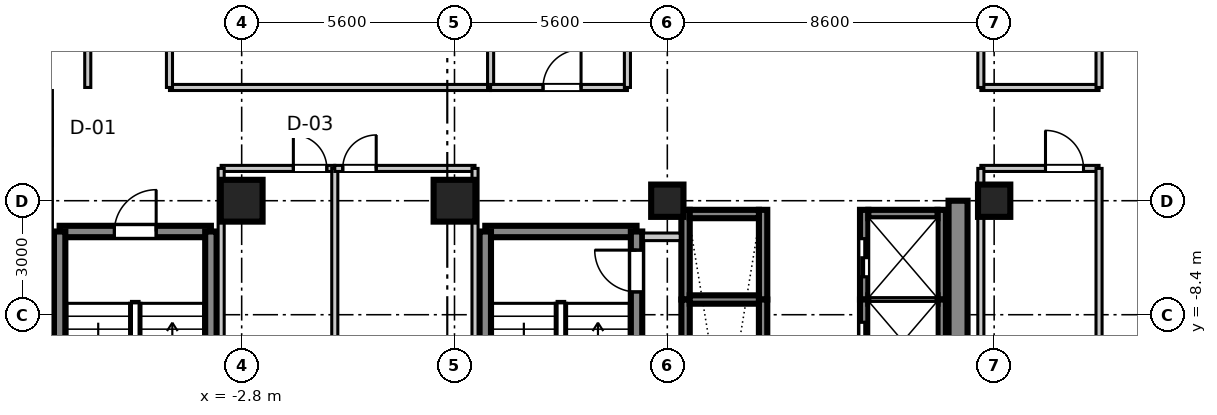
"""IFC4 building model, lengths in metres.
Left out: names, types, materials, properties, quantities, classifications, styles, units other than length and angle.
Written with IfcOpenShell. Run it as: python <this file> out.ifc"""

import sys

from ifc_helpers import new_model, si_unit, direction, frame, frame_2d, origin, origin_2d, place, context, subcontext, project, spatial, rectangle, extrude, source, transform, mapped, element, fill, save


model = new_model("IFC4")
c1 = context("Model", 3, precision=1e-05, world=origin(), true_north=direction((0.0, 1.0)))
c2 = subcontext(c1, "Body", "Model", "MODEL_VIEW")
j1 = project(units=[si_unit("LENGTHUNIT", "METRE"), si_unit("PLANEANGLEUNIT", "RADIAN")], contexts=[c1])
p1 = place(None, origin())
s1 = spatial("IfcSite", under=j1, at=p1, CompositionType="ELEMENT")
p2 = place(p1, origin())
s2 = spatial("IfcBuilding", under=s1, at=p2, CompositionType="ELEMENT")
p3 = place(p2, frame((0.0, 0.0, 192.8)))
s3 = spatial("IfcBuildingStorey", under=s2, at=p3, CompositionType="ELEMENT", Elevation=192.8)
m1 = source(origin(), c2, "Body", "SweptSolid", [
    extrude(rectangle(XDim=1.1, YDim=1.1, at=origin_2d()), origin(), (0.0, 0.0, 1.0), 3.605),
])
for number, where, z_axis, x_axis in (
    (1, (-2.8, -5.4, 0.0), (0.0, 0.0, 1.0), (1.0, 0.0, 0.0)),
    (2, (2.8, -5.4, 0.0), (0.0, 0.0, 1.0), (1.0, 0.0, 0.0)),
):
    element("IfcColumn", number, at=place(p3, frame(where, z_axis=z_axis, x_axis=x_axis)), inside=s3, PredefinedType="COLUMN", context=c2, shape_type="MappedRepresentation", body=[
        mapped(m1, transform((0.0, 0.0, 0.0), scale=1.0)),
    ])
m2 = source(origin(), c2, "Body", "SweptSolid", [
    extrude(rectangle(XDim=0.85, YDim=0.85, at=origin_2d()), origin(), (0.0, 0.0, 1.0), 3.605),
])
for number, where, z_axis, x_axis in (
    (3, (8.4, -5.4, 0.0), (0.0, 0.0, 1.0), (1.0, 0.0, 0.0)),
    (4, (17.0, -5.4, 0.0), (0.0, 0.0, 1.0), (1.0, 0.0, 0.0)),
):
    element("IfcColumn", number, at=place(p3, frame(where, z_axis=z_axis, x_axis=x_axis)), inside=s3, PredefinedType="PILASTER", context=c2, shape_type="MappedRepresentation", body=[
        mapped(m2, transform((0.0, 0.0, 0.0), scale=1.0)),
    ])
m3 = source(origin(), c2, "Body", "SweptSolid", [
    extrude(rectangle(XDim=11.6, YDim=0.5, at=frame_2d((5.8, 0.0))), origin(), (0.0, 0.0, 1.0), 3.39),
])
p4 = place(p3, frame((16.05, -17.0, 0.0), z_axis=(0.0, 0.0, 1.0), x_axis=(0.0, 1.0, 0.0)))
e5 = element("IfcWall", 5, at=p4, inside=s3, PredefinedType="SHEAR", context=c2, shape_type="MappedRepresentation", body=[
    mapped(m3, transform((0.0, 0.0, 0.0), scale=1.0)),
])
m4 = source(origin(), c2, "Body", "SweptSolid", [
    extrude(rectangle(XDim=3.98, YDim=0.3, at=frame_2d((1.99, 0.0))), origin(), (0.0, 0.0, 1.0), 3.39),
])
p5 = place(p3, frame((3.61, -6.21, 0.0), z_axis=(0.0, 0.0, 1.0), x_axis=(1.0, 0.0, 0.0)))
e6 = element("IfcWall", 6, at=p5, inside=s3, PredefinedType="SHEAR", context=c2, shape_type="MappedRepresentation", body=[
    mapped(m4, transform((0.0, 0.0, 0.0), scale=1.0)),
])
m5 = source(origin(), c2, "Body", "SweptSolid", [
    extrude(rectangle(XDim=9.38, YDim=0.3, at=frame_2d((4.69, 0.0))), origin(), (0.0, 0.0, 1.0), 3.39),
])
p6 = place(p3, frame((3.61, -15.59, 0.0), z_axis=(0.0, 0.0, 1.0), x_axis=(0.0, 1.0, 0.0)))
e7 = element("IfcWall", 7, at=p6, inside=s3, PredefinedType="SHEAR", context=c2, shape_type="MappedRepresentation", body=[
    mapped(m5, transform((0.0, 0.0, 0.0), scale=1.0)),
])
p7 = place(p3, frame((7.59, -15.59, 0.0), z_axis=(0.0, 0.0, 1.0), x_axis=(0.0, 1.0, 0.0)))
e8 = element("IfcWall", 8, at=p7, inside=s3, PredefinedType="SHEAR", context=c2, shape_type="MappedRepresentation", body=[
    mapped(m5, transform((0.0, 0.0, 0.0), scale=1.0)),
])
p8 = place(p7, frame((7.79, 0.0, 0.0)))
e9 = element("IfcOpeningElement", 9, at=p8, cuts=e8, PredefinedType="OPENING", context=c2, shape_type="SweptSolid", body=[
    extrude(rectangle(XDim=1.1, YDim=2.15, at=frame_2d((0.55, 1.075))), frame((0.0, 0.16, 0.0), z_axis=(0.0, -1.0, 0.0), x_axis=(1.0, 0.0, 0.0)), (0.0, 0.0, 1.0), 0.32),
])
p9 = place(p3, frame((-7.59, -6.21, 0.0), z_axis=(0.0, 0.0, 1.0), x_axis=(1.0, 0.0, 0.0)))
e10 = element("IfcWall", 10, at=p9, inside=s3, PredefinedType="SHEAR", context=c2, shape_type="MappedRepresentation", body=[
    mapped(m4, transform((0.0, 0.0, 0.0), scale=1.0)),
])
p10 = place(p9, frame((1.44, 0.0, 0.0)))
e11 = element("IfcOpeningElement", 11, at=p10, cuts=e10, PredefinedType="OPENING", context=c2, shape_type="SweptSolid", body=[
    extrude(rectangle(XDim=1.1, YDim=2.15, at=frame_2d((0.55, 1.075))), frame((0.0, 0.16, 0.0), z_axis=(0.0, -1.0, 0.0), x_axis=(1.0, 0.0, 0.0)), (0.0, 0.0, 1.0), 0.32),
])
for number, where, z_axis, x_axis in (
    (12, (-7.59, -15.59, 0.0), (0.0, 0.0, 1.0), (0.0, 1.0, 0.0)),
    (13, (-3.61, -15.59, 0.0), (0.0, 0.0, 1.0), (0.0, 1.0, 0.0)),
):
    element("IfcWall", number, at=place(p3, frame(where, z_axis=z_axis, x_axis=x_axis)), inside=s3, PredefinedType="SHEAR", context=c2, shape_type="MappedRepresentation", body=[
        mapped(m5, transform((0.0, 0.0, 0.0), scale=1.0)),
    ])
m6 = source(origin(), c2, "Body", "SweptSolid", [
    extrude(rectangle(XDim=2.36, YDim=0.22, at=frame_2d((1.18, 0.0))), origin(), (0.0, 0.0, 1.0), 3.39),
])
p11 = place(p3, frame((13.58, -8.0, 0.0), z_axis=(0.0, 0.0, 1.0), x_axis=(0.0, 1.0, 0.0)))
e14 = element("IfcWall", 14, at=p11, inside=s3, PredefinedType="SHEAR", context=c2, shape_type="MappedRepresentation", body=[
    mapped(m6, transform((0.0, 0.0, 0.0), scale=1.0)),
])
p12 = place(p11, frame((0.6, 0.0, 0.0)))
e15 = element("IfcOpeningElement", 15, at=p12, cuts=e14, PredefinedType="OPENING", context=c2, shape_type="SweptSolid", body=[
    extrude(rectangle(XDim=1.0, YDim=2.2, at=frame_2d((0.5, 1.1))), frame((0.0, 0.12, 0.0), z_axis=(0.0, -1.0, 0.0), x_axis=(1.0, 0.0, 0.0)), (0.0, 0.0, 1.0), 0.24),
])
p13 = place(p3, frame((15.62, -8.0, 0.0), z_axis=(0.0, 0.0, 1.0), x_axis=(0.0, 1.0, 0.0)))
e16 = element("IfcWall", 16, at=p13, inside=s3, PredefinedType="SHEAR", context=c2, shape_type="MappedRepresentation", body=[
    mapped(m6, transform((0.0, 0.0, 0.0), scale=1.0)),
])
m7 = source(origin(), c2, "Body", "SweptSolid", [
    extrude(rectangle(XDim=1.82, YDim=0.22, at=frame_2d((0.91, 0.0))), origin(), (0.0, 0.0, 1.0), 3.39),
])
p14 = place(p3, frame((13.69, -5.75, 0.0), z_axis=(0.0, 0.0, 1.0), x_axis=(1.0, 0.0, 0.0)))
e17 = element("IfcWall", 17, at=p14, inside=s3, PredefinedType="SHEAR", context=c2, shape_type="MappedRepresentation", body=[
    mapped(m7, transform((0.0, 0.0, 0.0), scale=1.0)),
])
m8 = source(origin(), c2, "Body", "SweptSolid", [
    extrude(rectangle(XDim=2.2, YDim=0.22, at=frame_2d((1.1, 0.0))), origin(), (0.0, 0.0, 1.0), 3.39),
])
p15 = place(p3, frame((13.58, -10.2, 0.0), z_axis=(0.0, 0.0, 1.0), x_axis=(0.0, 1.0, 0.0)))
e18 = element("IfcWall", 18, at=p15, inside=s3, PredefinedType="SHEAR", context=c2, shape_type="MappedRepresentation", body=[
    mapped(m8, transform((0.0, 0.0, 0.0), scale=1.0)),
])
p16 = place(p15, frame((0.6, 0.0, 0.0)))
e19 = element("IfcOpeningElement", 19, at=p16, cuts=e18, PredefinedType="OPENING", context=c2, shape_type="SweptSolid", body=[
    extrude(rectangle(XDim=1.0, YDim=2.2, at=frame_2d((0.5, 1.1))), frame((0.0, 0.12, 0.0), z_axis=(0.0, -1.0, 0.0), x_axis=(1.0, 0.0, 0.0)), (0.0, 0.0, 1.0), 0.24),
])
p17 = place(p3, frame((15.62, -10.2, 0.0), z_axis=(0.0, 0.0, 1.0), x_axis=(0.0, 1.0, 0.0)))
e20 = element("IfcWall", 20, at=p17, inside=s3, PredefinedType="SHEAR", context=c2, shape_type="MappedRepresentation", body=[
    mapped(m8, transform((0.0, 0.0, 0.0), scale=1.0)),
])
m9 = source(origin(), c2, "Body", "SweptSolid", [
    extrude(rectangle(XDim=1.82, YDim=0.22, at=frame_2d((0.91, 0.0))), origin(), (0.0, 0.0, 1.0), 3.65),
])
p18 = place(p3, frame((13.69, -8.0, 0.0), z_axis=(0.0, 0.0, 1.0), x_axis=(1.0, 0.0, 0.0)))
e21 = element("IfcWall", 21, at=p18, inside=s3, PredefinedType="SHEAR", context=c2, shape_type="MappedRepresentation", body=[
    mapped(m9, transform((0.0, 0.0, 0.0), scale=1.0)),
])
for number, where, z_axis, x_axis in (
    (22, (8.88, -8.0, 0.0), (0.0, 0.0, 1.0), (0.0, 1.0, 0.0)),
    (23, (10.92, -8.0, 0.0), (0.0, 0.0, 1.0), (0.0, 1.0, 0.0)),
):
    element("IfcWall", number, at=place(p3, frame(where, z_axis=z_axis, x_axis=x_axis)), inside=s3, PredefinedType="SHEAR", context=c2, shape_type="MappedRepresentation", body=[
        mapped(m6, transform((0.0, 0.0, 0.0), scale=1.0)),
    ])
p19 = place(p3, frame((8.99, -5.75, 0.0), z_axis=(0.0, 0.0, 1.0), x_axis=(1.0, 0.0, 0.0)))
e24 = element("IfcWall", 24, at=p19, inside=s3, PredefinedType="SHEAR", context=c2, shape_type="MappedRepresentation", body=[
    mapped(m7, transform((0.0, 0.0, 0.0), scale=1.0)),
])
for number, where, z_axis, x_axis in (
    (25, (8.88, -10.2, 0.0), (0.0, 0.0, 1.0), (0.0, 1.0, 0.0)),
    (26, (10.92, -10.2, 0.0), (0.0, 0.0, 1.0), (0.0, 1.0, 0.0)),
):
    element("IfcWall", number, at=place(p3, frame(where, z_axis=z_axis, x_axis=x_axis)), inside=s3, PredefinedType="SHEAR", context=c2, shape_type="MappedRepresentation", body=[
        mapped(m8, transform((0.0, 0.0, 0.0), scale=1.0)),
    ])
p20 = place(p3, frame((8.99, -8.0, 0.0), z_axis=(0.0, 0.0, 1.0), x_axis=(1.0, 0.0, 0.0)))
e27 = element("IfcWall", 27, at=p20, inside=s3, PredefinedType="SHEAR", context=c2, shape_type="MappedRepresentation", body=[
    mapped(m9, transform((0.0, 0.0, 0.0), scale=1.0)),
])
m10 = source(origin(), c2, "Body", "SweptSolid", [
    extrude(rectangle(XDim=0.97, YDim=0.2, at=frame_2d((0.485, 0.0))), origin(), (0.0, 0.0, 1.0), 2.73),
])
p21 = place(p3, frame((7.77, -6.35, 0.0), z_axis=(0.0, 0.0, 1.0), x_axis=(1.0, 0.0, 0.0)))
e28 = element("IfcWall", 28, at=p21, inside=s3, PredefinedType="PARTITIONING", context=c2, shape_type="MappedRepresentation", body=[
    mapped(m10, transform((0.0, 0.0, 0.0), scale=1.0)),
])
m11 = source(origin(), c2, "Body", "SweptSolid", [
    extrude(rectangle(XDim=3.11, YDim=0.16, at=frame_2d((1.555, 0.0))), origin(), (0.0, 0.0, 1.0), 2.73),
])
p22 = place(p3, frame((16.65, -4.55, 0.0), z_axis=(0.0, 0.0, 1.0), x_axis=(1.0, 0.0, 0.0)))
e29 = element("IfcWall", 29, at=p22, inside=s3, PredefinedType="PARTITIONING", context=c2, shape_type="MappedRepresentation", body=[
    mapped(m11, transform((0.0, 0.0, 0.0), scale=1.0)),
])
p23 = place(p22, frame((1.701, 0.0, 0.0)))
e30 = element("IfcOpeningElement", 30, at=p23, cuts=e29, PredefinedType="OPENING", context=c2, shape_type="SweptSolid", body=[
    extrude(rectangle(XDim=1.0, YDim=2.1, at=frame_2d((0.5, 1.05))), frame((0.0, 0.09, 0.0), z_axis=(0.0, -1.0, 0.0), x_axis=(1.0, 0.0, 0.0)), (0.0, 0.0, 1.0), 0.18),
])
m12 = source(origin(), c2, "Body", "SweptSolid", [
    extrude(rectangle(XDim=17.95, YDim=0.16, at=frame_2d((8.975, 0.0))), origin(), (0.0, 0.0, 1.0), 2.73),
])
p24 = place(p3, frame((16.65, -22.5, 0.0), z_axis=(0.0, 0.0, 1.0), x_axis=(0.0, 1.0, 0.0)))
e31 = element("IfcWall", 31, at=p24, inside=s3, PredefinedType="PARTITIONING", context=c2, shape_type="MappedRepresentation", body=[
    mapped(m12, transform((0.0, 0.0, 0.0), scale=1.0)),
])
m13 = source(origin(), c2, "Body", "SweptSolid", [
    extrude(rectangle(XDim=16.53, YDim=0.16, at=frame_2d((8.265, 0.0))), origin(), (0.0, 0.0, 1.0), 2.73),
])
p25 = place(p3, frame((19.76, -21.08, 0.0), z_axis=(0.0, 0.0, 1.0), x_axis=(0.0, 1.0, 0.0)))
e32 = element("IfcWall", 32, at=p25, inside=s3, PredefinedType="PARTITIONING", context=c2, shape_type="MappedRepresentation", body=[
    mapped(m13, transform((0.0, 0.0, 0.0), scale=1.0)),
])
m14 = source(origin(), c2, "Body", "SweptSolid", [
    extrude(rectangle(XDim=20.0, YDim=0.16, at=frame_2d((10.0, 0.0))), origin(), (0.0, 0.0, 1.0), 2.73),
])
p26 = place(p3, frame((-7.86, -22.5, 0.0), z_axis=(0.0, 0.0, 1.0), x_axis=(0.0, 1.0, 0.0)))
e33 = element("IfcWall", 33, at=p26, inside=s3, PredefinedType="PARTITIONING", context=c2, shape_type="MappedRepresentation", body=[
    mapped(m14, transform((0.0, 0.0, 0.0), scale=1.0)),
])
p27 = place(p26, frame((18.525, 0.0, 0.0)))
e34 = element("IfcOpeningElement", 34, at=p27, cuts=e33, PredefinedType="OPENING", context=c2, shape_type="SweptSolid", body=[
    extrude(rectangle(XDim=0.95, YDim=2.1, at=frame_2d((0.475, 1.05))), frame((0.0, 0.09, 0.0), z_axis=(0.0, -1.0, 0.0), x_axis=(1.0, 0.0, 0.0)), (0.0, 0.0, 1.0), 0.18),
])
m15 = source(origin(), c2, "Body", "SweptSolid", [
    extrude(rectangle(XDim=2.99, YDim=0.16, at=frame_2d((1.495, 0.0))), origin(), (0.0, 0.0, 1.0), 2.73),
])
p28 = place(p3, frame((-3.34, -4.55, 0.0), z_axis=(0.0, 0.0, 1.0), x_axis=(1.0, 0.0, 0.0)))
e35 = element("IfcWall", 35, at=p28, inside=s3, PredefinedType="PARTITIONING", context=c2, shape_type="MappedRepresentation", body=[
    mapped(m15, transform((0.0, 0.0, 0.0), scale=1.0)),
])
p29 = place(p28, frame((1.9, 0.0, 0.0)))
e36 = element("IfcOpeningElement", 36, at=p29, cuts=e35, PredefinedType="OPENING", context=c2, shape_type="SweptSolid", body=[
    extrude(rectangle(XDim=0.88, YDim=2.1, at=frame_2d((0.44, 1.05))), frame((0.0, 0.09, 0.0), z_axis=(0.0, -1.0, 0.0), x_axis=(1.0, 0.0, 0.0)), (0.0, 0.0, 1.0), 0.18),
])
for number, where, z_axis, x_axis in (
    (37, (-3.34, -22.5, 0.0), (0.0, 0.0, 1.0), (0.0, 1.0, 0.0)),
    (38, (-0.35, -22.5, 0.0), (0.0, 0.0, 1.0), (0.0, 1.0, 0.0)),
):
    element("IfcWall", number, at=place(p3, frame(where, z_axis=z_axis, x_axis=x_axis)), inside=s3, PredefinedType="PARTITIONING", context=c2, shape_type="MappedRepresentation", body=[
        mapped(m12, transform((0.0, 0.0, 0.0), scale=1.0)),
    ])
m16 = source(origin(), c2, "Body", "SweptSolid", [
    extrude(rectangle(XDim=3.69, YDim=0.16, at=frame_2d((1.845, 0.0))), origin(), (0.0, 0.0, 1.0), 2.73),
])
p30 = place(p3, frame((-0.35, -4.55, 0.0), z_axis=(0.0, 0.0, 1.0), x_axis=(1.0, 0.0, 0.0)))
e39 = element("IfcWall", 39, at=p30, inside=s3, PredefinedType="PARTITIONING", context=c2, shape_type="MappedRepresentation", body=[
    mapped(m16, transform((0.0, 0.0, 0.0), scale=1.0)),
])
p31 = place(p30, frame((0.21, 0.0, 0.0)))
e40 = element("IfcOpeningElement", 40, at=p31, cuts=e39, PredefinedType="OPENING", context=c2, shape_type="SweptSolid", body=[
    extrude(rectangle(XDim=0.88, YDim=2.1, at=frame_2d((0.44, 1.05))), frame((0.0, 0.09, 0.0), z_axis=(0.0, -1.0, 0.0), x_axis=(1.0, 0.0, 0.0)), (0.0, 0.0, 1.0), 0.18),
])
p32 = place(p3, frame((3.34, -22.5, 0.0), z_axis=(0.0, 0.0, 1.0), x_axis=(0.0, 1.0, 0.0)))
e41 = element("IfcWall", 41, at=p32, inside=s3, PredefinedType="PARTITIONING", context=c2, shape_type="MappedRepresentation", body=[
    mapped(m12, transform((0.0, 0.0, 0.0), scale=1.0)),
])
m17 = source(origin(), c2, "Body", "SweptSolid", [
    extrude(rectangle(XDim=4.84, YDim=0.16, at=frame_2d((2.42, 0.0))), origin(), (0.0, 0.0, 1.0), 2.73),
])
p33 = place(p3, frame((-6.85, -2.42, 0.0), z_axis=(0.0, 0.0, 1.0), x_axis=(0.0, 1.0, 0.0)))
e42 = element("IfcWall", 42, at=p33, inside=s3, PredefinedType="PARTITIONING", context=c2, shape_type="MappedRepresentation", body=[
    mapped(m17, transform((0.0, 0.0, 0.0), scale=1.0)),
])
p34 = place(p33, frame((1.945, 0.0, 0.0)))
e43 = element("IfcOpeningElement", 43, at=p34, cuts=e42, PredefinedType="OPENING", context=c2, shape_type="SweptSolid", body=[
    extrude(rectangle(XDim=0.95, YDim=2.1, at=frame_2d((0.475, 1.05))), frame((0.0, 0.09, 0.0), z_axis=(0.0, -1.0, 0.0), x_axis=(1.0, 0.0, 0.0)), (0.0, 0.0, 1.0), 0.18),
])
m18 = source(origin(), c2, "Body", "SweptSolid", [
    extrude(rectangle(XDim=8.45, YDim=0.16, at=frame_2d((4.225, 0.0))), origin(), (0.0, 0.0, 1.0), 2.73),
])
p35 = place(p3, frame((-4.7, -2.42, 0.0), z_axis=(0.0, 0.0, 1.0), x_axis=(1.0, 0.0, 0.0)))
e44 = element("IfcWall", 44, at=p35, inside=s3, PredefinedType="PARTITIONING", context=c2, shape_type="MappedRepresentation", body=[
    mapped(m18, transform((0.0, 0.0, 0.0), scale=1.0)),
])
for number, where, z_axis, x_axis in (
    (45, (-4.7, -2.42, 0.0), (0.0, 0.0, 1.0), (0.0, 1.0, 0.0)),
    (46, (3.75, -2.42, 0.0), (0.0, 0.0, 1.0), (0.0, 1.0, 0.0)),
):
    element("IfcWall", number, at=place(p3, frame(where, z_axis=z_axis, x_axis=x_axis)), inside=s3, PredefinedType="PARTITIONING", context=c2, shape_type="MappedRepresentation", body=[
        mapped(m17, transform((0.0, 0.0, 0.0), scale=1.0)),
    ])
m19 = source(origin(), c2, "Body", "SweptSolid", [
    extrude(rectangle(XDim=3.6, YDim=0.16, at=frame_2d((1.8, 0.0))), origin(), (0.0, 0.0, 1.0), 2.73),
])
p36 = place(p3, frame((3.75, -2.42, 0.0), z_axis=(0.0, 0.0, 1.0), x_axis=(1.0, 0.0, 0.0)))
e47 = element("IfcWall", 47, at=p36, inside=s3, PredefinedType="PARTITIONING", context=c2, shape_type="MappedRepresentation", body=[
    mapped(m19, transform((0.0, 0.0, 0.0), scale=1.0)),
])
p37 = place(p36, frame((1.38, 0.0, 0.0)))
e48 = element("IfcOpeningElement", 48, at=p37, cuts=e47, PredefinedType="OPENING", context=c2, shape_type="SweptSolid", body=[
    extrude(rectangle(XDim=1.0, YDim=2.1, at=frame_2d((0.5, 1.05))), frame((0.0, 0.09, 0.0), z_axis=(0.0, -1.0, 0.0), x_axis=(1.0, 0.0, 0.0)), (0.0, 0.0, 1.0), 0.18),
])
p38 = place(p3, frame((7.35, -2.42, 0.0), z_axis=(0.0, 0.0, 1.0), x_axis=(0.0, 1.0, 0.0)))
e49 = element("IfcWall", 49, at=p38, inside=s3, PredefinedType="PARTITIONING", context=c2, shape_type="MappedRepresentation", body=[
    mapped(m17, transform((0.0, 0.0, 0.0), scale=1.0)),
])
p39 = place(p3, frame((16.65, -2.42, 0.0), z_axis=(0.0, 0.0, 1.0), x_axis=(1.0, 0.0, 0.0)))
e50 = element("IfcWall", 50, at=p39, inside=s3, PredefinedType="PARTITIONING", context=c2, shape_type="MappedRepresentation", body=[
    mapped(m11, transform((0.0, 0.0, 0.0), scale=1.0)),
])
for number, where, z_axis, x_axis in (
    (51, (16.65, -2.42, 0.0), (0.0, 0.0, 1.0), (0.0, 1.0, 0.0)),
    (52, (19.76, -2.42, 0.0), (0.0, 0.0, 1.0), (0.0, 1.0, 0.0)),
):
    element("IfcWall", number, at=place(p3, frame(where, z_axis=z_axis, x_axis=x_axis)), inside=s3, PredefinedType="PARTITIONING", context=c2, shape_type="MappedRepresentation", body=[
        mapped(m17, transform((0.0, 0.0, 0.0), scale=1.0)),
    ])
m20 = source(origin(), c2, "Body", "SweptSolid", [
    extrude(rectangle(XDim=1.1, YDim=2.15, at=frame_2d((0.55, 1.075))), frame((0.0, 0.025, 0.0), z_axis=(0.0, -1.0, 0.0), x_axis=(1.0, 0.0, 0.0)), (0.0, 0.0, 1.0), 0.05),
])
p40 = place(p8, origin())
e53 = element("IfcDoor", 53, at=p40, inside=s3, OperationType="SINGLE_SWING_RIGHT", PredefinedType="DOOR", context=c2, shape_type="MappedRepresentation", body=[
    mapped(m20, transform((0.0, 0.0, 0.0), scale=1.0)),
])
fill(e9, e53)
p41 = place(p10, frame((1.1, 0.0, 0.0), z_axis=(0.0, 0.0, 1.0), x_axis=(-1.0, 0.0, 0.0)))
e54 = element("IfcDoor", 54, at=p41, inside=s3, OperationType="SINGLE_SWING_RIGHT", PredefinedType="DOOR", context=c2, shape_type="MappedRepresentation", body=[
    mapped(m20, transform((0.0, 0.0, 0.0), scale=1.0)),
])
fill(e11, e54)
m21 = source(origin(), c2, "Body", "SweptSolid", [
    extrude(rectangle(XDim=1.0, YDim=2.2, at=frame_2d((0.5, 1.1))), frame((0.0, 0.025, 0.0), z_axis=(0.0, -1.0, 0.0), x_axis=(1.0, 0.0, 0.0)), (0.0, 0.0, 1.0), 0.05),
])
p42 = place(p12, origin())
e55 = element("IfcDoor", 55, at=p42, inside=s3, OperationType="DOUBLE_DOOR_SLIDING", PredefinedType="DOOR", context=c2, shape_type="MappedRepresentation", body=[
    mapped(m21, transform((0.0, 0.0, 0.0), scale=1.0)),
])
fill(e15, e55)
p43 = place(p16, origin())
e56 = element("IfcDoor", 56, at=p43, inside=s3, OperationType="DOUBLE_DOOR_SLIDING", PredefinedType="DOOR", context=c2, shape_type="MappedRepresentation", body=[
    mapped(m21, transform((0.0, 0.0, 0.0), scale=1.0)),
])
fill(e19, e56)
m22 = source(origin(), c2, "Body", "SweptSolid", [
    extrude(rectangle(XDim=1.0, YDim=2.1, at=frame_2d((0.5, 1.05))), frame((0.0, 0.025, 0.0), z_axis=(0.0, -1.0, 0.0), x_axis=(1.0, 0.0, 0.0)), (0.0, 0.0, 1.0), 0.05),
])
p44 = place(p23, frame((1.0, 0.0, 0.0), z_axis=(0.0, 0.0, 1.0), x_axis=(-1.0, 0.0, 0.0)))
e57 = element("IfcDoor", 57, at=p44, inside=s3, OperationType="SINGLE_SWING_LEFT", PredefinedType="DOOR", context=c2, shape_type="MappedRepresentation", body=[
    mapped(m22, transform((0.0, 0.0, 0.0), scale=1.0)),
])
fill(e30, e57)
m23 = source(origin(), c2, "Body", "SweptSolid", [
    extrude(rectangle(XDim=0.88, YDim=2.1, at=frame_2d((0.44, 1.05))), frame((0.0, 0.025, 0.0), z_axis=(0.0, -1.0, 0.0), x_axis=(1.0, 0.0, 0.0)), (0.0, 0.0, 1.0), 0.05),
])
p45 = place(p29, frame((0.88, 0.0, 0.0), z_axis=(0.0, 0.0, 1.0), x_axis=(-1.0, 0.0, 0.0)))
e58 = element("IfcDoor", 58, at=p45, inside=s3, OperationType="SINGLE_SWING_LEFT", PredefinedType="DOOR", context=c2, shape_type="MappedRepresentation", body=[
    mapped(m23, transform((0.0, 0.0, 0.0), scale=1.0)),
])
fill(e36, e58)
p46 = place(p31, frame((0.88, 0.0, 0.0), z_axis=(0.0, 0.0, 1.0), x_axis=(-1.0, 0.0, 0.0)))
e59 = element("IfcDoor", 59, at=p46, inside=s3, OperationType="SINGLE_SWING_RIGHT", PredefinedType="DOOR", context=c2, shape_type="MappedRepresentation", body=[
    mapped(m23, transform((0.0, 0.0, 0.0), scale=1.0)),
])
fill(e40, e59)
p47 = place(p37, origin())
e60 = element("IfcDoor", 60, at=p47, inside=s3, OperationType="SINGLE_SWING_RIGHT", PredefinedType="DOOR", context=c2, shape_type="MappedRepresentation", body=[
    mapped(m22, transform((0.0, 0.0, 0.0), scale=1.0)),
])
fill(e48, e60)
save(model, sys.argv[1])
